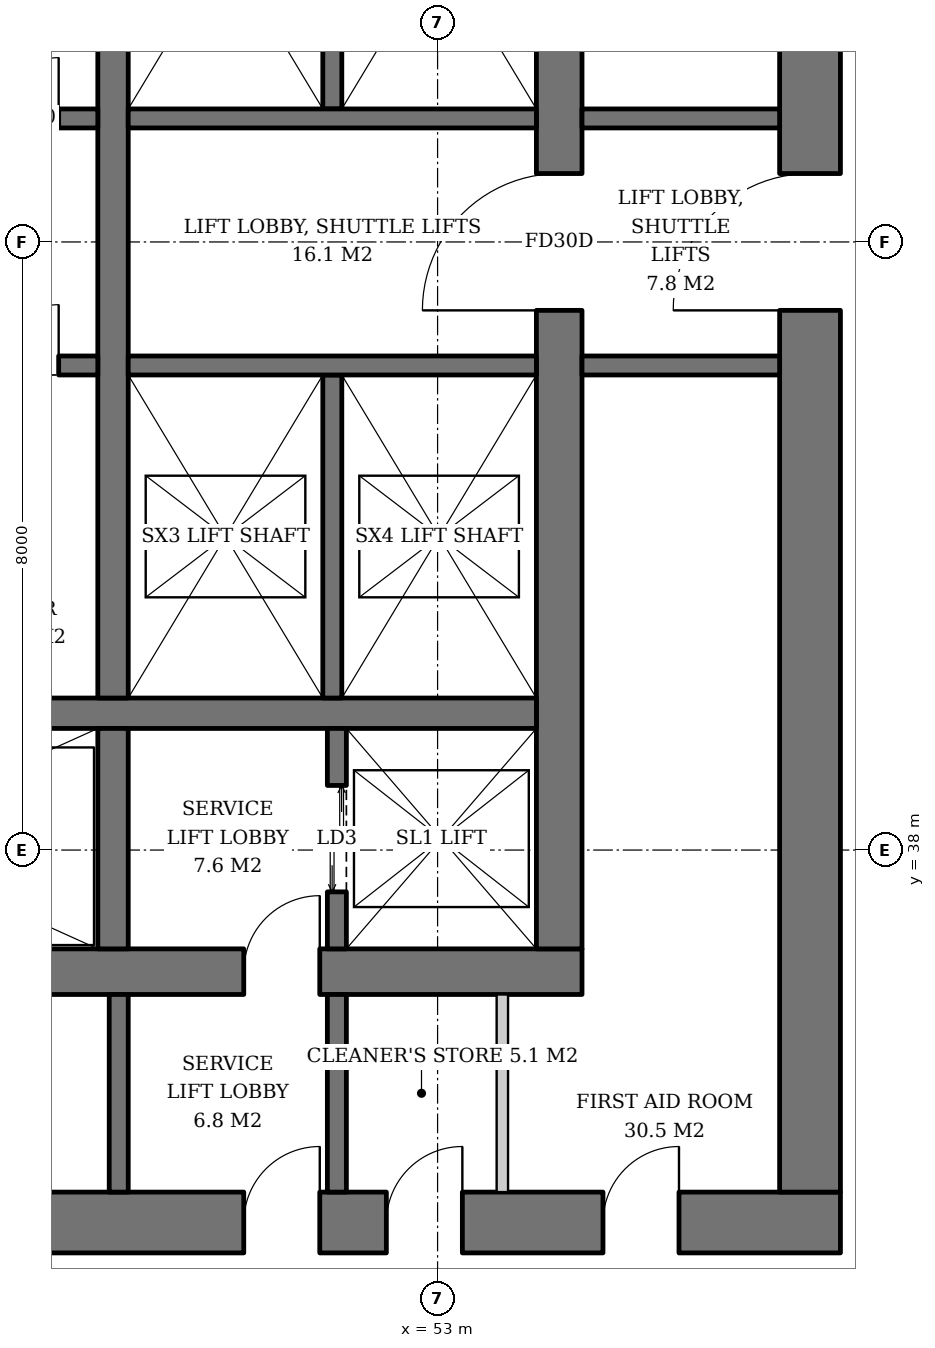
"""IFC4 building model, lengths in metres.
Left out: names, types, materials, properties, quantities, classifications, styles, units other than length and angle.
Written with IfcOpenShell. Run it as: python <this file> out.ifc"""

import sys

from ifc_helpers import new_model, si_unit, direction, frame, frame_2d, origin, place, context, subcontext, project, spatial, rectangle, extrude, element, fill, save


model = new_model("IFC4")
c1 = context("Model", 3, precision=1e-05, world=origin(), true_north=direction((0.0, 1.0)))
c2 = subcontext(c1, "Body", "Model", "MODEL_VIEW")
j1 = project(units=[si_unit("LENGTHUNIT", "METRE"), si_unit("PLANEANGLEUNIT", "RADIAN")], contexts=[c1])
p1 = place(None, origin())
s1 = spatial("IfcSite", under=j1, at=p1, CompositionType="ELEMENT")
p2 = place(p1, origin())
s2 = spatial("IfcBuilding", under=s1, at=p2, CompositionType="ELEMENT")
p3 = place(p2, frame((0.0, 0.0, 62.8)))
s3 = spatial("IfcBuildingStorey", under=s2, at=p3, CompositionType="ELEMENT", Elevation=62.8)
p4 = place(p3, frame((35.1, 36.4, 0.0), z_axis=(0.0, 0.0, 1.0), x_axis=(1.0, 0.0, 0.0)))
e1 = element("IfcWall", 1, at=p4, inside=s3, PredefinedType="SHEAR", context=c2, shape_type="SweptSolid", body=[
    extrude(rectangle(XDim=19.8, YDim=0.6, at=frame_2d((9.9, 0.0))), origin(), (0.0, 0.0, 1.0), 3.8),
])
p5 = place(p4, frame((3.9, 0.0, 0.0)))
e2 = element("IfcOpeningElement", 2, at=p5, cuts=e1, PredefinedType="OPENING", context=c2, shape_type="SweptSolid", body=[
    extrude(rectangle(XDim=1.0, YDim=2.1, at=frame_2d((0.5, 1.05))), frame((0.0, 0.31, 0.0), z_axis=(0.0, -1.0, 0.0), x_axis=(1.0, 0.0, 0.0)), (0.0, 0.0, 1.0), 0.62),
])
p6 = place(p4, frame((15.35, 0.0, 0.0)))
e3 = element("IfcOpeningElement", 3, at=p6, cuts=e1, PredefinedType="OPENING", context=c2, shape_type="SweptSolid", body=[
    extrude(rectangle(XDim=1.0, YDim=2.1, at=frame_2d((0.5, 1.05))), frame((0.0, 0.31, 0.0), z_axis=(0.0, -1.0, 0.0), x_axis=(1.0, 0.0, 0.0)), (0.0, 0.0, 1.0), 0.62),
])
p7 = place(p3, frame((54.6, 36.7, 0.0), z_axis=(0.0, 0.0, 1.0), x_axis=(0.0, 1.0, 0.0)))
e4 = element("IfcWall", 4, at=p7, inside=s3, PredefinedType="SHEAR", context=c2, shape_type="SweptSolid", body=[
    extrude(rectangle(XDim=18.6, YDim=0.6, at=frame_2d((9.3, 0.0))), origin(), (0.0, 0.0, 1.0), 3.8),
])
p8 = place(p7, frame((8.4, 0.0, 0.0)))
e5 = element("IfcOpeningElement", 5, at=p8, cuts=e4, PredefinedType="OPENING", context=c2, shape_type="SweptSolid", body=[
    extrude(rectangle(XDim=1.8, YDim=2.4, at=frame_2d((0.9, 1.2))), frame((0.0, 0.31, 0.0), z_axis=(0.0, -1.0, 0.0), x_axis=(1.0, 0.0, 0.0)), (0.0, 0.0, 1.0), 0.62),
])
p9 = place(p3, frame((31.7, 33.1, 0.0), z_axis=(0.0, 0.0, 1.0), x_axis=(1.0, 0.0, 0.0)))
e6 = element("IfcWall", 6, at=p9, inside=s3, PredefinedType="SHEAR", context=c2, shape_type="SweptSolid", body=[
    extrude(rectangle(XDim=26.6, YDim=0.8, at=frame_2d((13.3, 0.0))), origin(), (0.0, 0.0, 1.0), 3.8),
])
p10 = place(p9, frame((7.3, 0.0, 0.0)))
e7 = element("IfcOpeningElement", 7, at=p10, cuts=e6, PredefinedType="OPENING", context=c2, shape_type="SweptSolid", body=[
    extrude(rectangle(XDim=1.0, YDim=2.1, at=frame_2d((0.5, 1.05))), frame((0.0, 0.41, 0.0), z_axis=(0.0, -1.0, 0.0), x_axis=(1.0, 0.0, 0.0)), (0.0, 0.0, 1.0), 0.82),
])
p11 = place(p9, frame((18.75, 0.0, 0.0)))
e8 = element("IfcOpeningElement", 8, at=p11, cuts=e6, PredefinedType="OPENING", context=c2, shape_type="SweptSolid", body=[
    extrude(rectangle(XDim=1.0, YDim=2.1, at=frame_2d((0.5, 1.05))), frame((0.0, 0.41, 0.0), z_axis=(0.0, -1.0, 0.0), x_axis=(1.0, 0.0, 0.0)), (0.0, 0.0, 1.0), 0.82),
])
p12 = place(p9, frame((1.9, 0.0, 0.0)))
e9 = element("IfcOpeningElement", 9, at=p12, cuts=e6, PredefinedType="OPENING", context=c2, shape_type="SweptSolid", body=[
    extrude(rectangle(XDim=1.0, YDim=2.1, at=frame_2d((0.5, 1.05))), frame((0.0, 0.41, 0.0), z_axis=(0.0, -1.0, 0.0), x_axis=(1.0, 0.0, 0.0)), (0.0, 0.0, 1.0), 0.82),
])
p13 = place(p9, frame((4.725, 0.0, 0.0)))
e10 = element("IfcOpeningElement", 10, at=p13, cuts=e6, PredefinedType="OPENING", context=c2, shape_type="SweptSolid", body=[
    extrude(rectangle(XDim=1.0, YDim=2.1, at=frame_2d((0.5, 1.05))), frame((0.0, 0.41, 0.0), z_axis=(0.0, -1.0, 0.0), x_axis=(1.0, 0.0, 0.0)), (0.0, 0.0, 1.0), 0.82),
])
p14 = place(p9, frame((12.44, 0.0, 0.0)))
e11 = element("IfcOpeningElement", 11, at=p14, cuts=e6, PredefinedType="OPENING", context=c2, shape_type="SweptSolid", body=[
    extrude(rectangle(XDim=1.0, YDim=2.1, at=frame_2d((0.5, 1.05))), frame((0.0, 0.41, 0.0), z_axis=(0.0, -1.0, 0.0), x_axis=(1.0, 0.0, 0.0)), (0.0, 0.0, 1.0), 0.82),
])
p15 = place(p9, frame((20.626, 0.0, 0.0)))
e12 = element("IfcOpeningElement", 12, at=p15, cuts=e6, PredefinedType="OPENING", context=c2, shape_type="SweptSolid", body=[
    extrude(rectangle(XDim=1.0, YDim=2.1, at=frame_2d((0.5, 1.05))), frame((0.0, 0.41, 0.0), z_axis=(0.0, -1.0, 0.0), x_axis=(1.0, 0.0, 0.0)), (0.0, 0.0, 1.0), 0.82),
])
p16 = place(p9, frame((23.476, 0.0, 0.0)))
e13 = element("IfcOpeningElement", 13, at=p16, cuts=e6, PredefinedType="OPENING", context=c2, shape_type="SweptSolid", body=[
    extrude(rectangle(XDim=1.0, YDim=2.1, at=frame_2d((0.5, 1.05))), frame((0.0, 0.41, 0.0), z_axis=(0.0, -1.0, 0.0), x_axis=(1.0, 0.0, 0.0)), (0.0, 0.0, 1.0), 0.82),
])
p17 = place(p3, frame((57.9, 33.5, 0.0), z_axis=(0.0, 0.0, 1.0), x_axis=(0.0, 1.0, 0.0)))
e14 = element("IfcWall", 14, at=p17, inside=s3, PredefinedType="SHEAR", context=c2, shape_type="SweptSolid", body=[
    extrude(rectangle(XDim=25.0, YDim=0.8, at=frame_2d((12.5, 0.0))), origin(), (0.0, 0.0, 1.0), 3.8),
])
p18 = place(p17, frame((11.6, 0.0, 0.0)))
e15 = element("IfcOpeningElement", 15, at=p18, cuts=e14, PredefinedType="OPENING", context=c2, shape_type="SweptSolid", body=[
    extrude(rectangle(XDim=1.8, YDim=2.4, at=frame_2d((0.9, 1.2))), frame((0.0, 0.41, 0.0), z_axis=(0.0, -1.0, 0.0), x_axis=(1.0, 0.0, 0.0)), (0.0, 0.0, 1.0), 0.82),
])
p19 = place(p3, frame((35.7, 39.8, 0.0), z_axis=(0.0, 0.0, 1.0), x_axis=(1.0, 0.0, 0.0)))
e16 = element("IfcWall", 16, at=p19, inside=s3, PredefinedType="SHEAR", context=c2, shape_type="SweptSolid", body=[
    extrude(rectangle(XDim=18.6, YDim=0.4, at=frame_2d((9.3, 0.0))), origin(), (0.0, 0.0, 1.0), 3.8),
])
p20 = place(p3, frame((48.73, 36.7, 0.0), z_axis=(0.0, 0.0, 1.0), x_axis=(0.0, 1.0, 0.0)))
e17 = element("IfcWall", 17, at=p20, inside=s3, PredefinedType="SHEAR", context=c2, shape_type="SweptSolid", body=[
    extrude(rectangle(XDim=2.9, YDim=0.4, at=frame_2d((1.45, 0.0))), origin(), (0.0, 0.0, 1.0), 3.8),
])
p21 = place(p3, frame((48.73, 40.0, 0.0), z_axis=(0.0, 0.0, 1.0), x_axis=(0.0, 1.0, 0.0)))
e18 = element("IfcWall", 18, at=p21, inside=s3, PredefinedType="SHEAR", context=c2, shape_type="SweptSolid", body=[
    extrude(rectangle(XDim=12.0, YDim=0.4, at=frame_2d((6.0, 0.0))), origin(), (0.0, 0.0, 1.0), 3.8),
])
p22 = place(p3, frame((51.675, 36.7, 0.0), z_axis=(0.0, 0.0, 1.0), x_axis=(0.0, 1.0, 0.0)))
e19 = element("IfcWall", 19, at=p22, inside=s3, PredefinedType="SHEAR", context=c2, shape_type="SweptSolid", body=[
    extrude(rectangle(XDim=2.9, YDim=0.25, at=frame_2d((1.45, 0.0))), origin(), (0.0, 0.0, 1.0), 3.8),
])
p23 = place(p22, frame((0.75, 0.0, 0.0)))
e20 = element("IfcOpeningElement", 20, at=p23, cuts=e19, PredefinedType="OPENING", context=c2, shape_type="SweptSolid", body=[
    extrude(rectangle(XDim=1.4, YDim=2.4, at=frame_2d((0.7, 1.2))), frame((0.0, 0.135, 0.0), z_axis=(0.0, -1.0, 0.0), x_axis=(1.0, 0.0, 0.0)), (0.0, 0.0, 1.0), 0.27),
])
p24 = place(p3, frame((35.7, 47.625, 0.0), z_axis=(0.0, 0.0, 1.0), x_axis=(1.0, 0.0, 0.0)))
e21 = element("IfcWall", 21, at=p24, inside=s3, PredefinedType="SHEAR", context=c2, shape_type="SweptSolid", body=[
    extrude(rectangle(XDim=12.83, YDim=0.25, at=frame_2d((6.415, 0.0))), origin(), (0.0, 0.0, 1.0), 3.8),
])
p25 = place(p24, frame((0.7, 0.0, 0.0)))
e22 = element("IfcOpeningElement", 22, at=p25, cuts=e21, PredefinedType="OPENING", context=c2, shape_type="SweptSolid", body=[
    extrude(rectangle(XDim=1.1, YDim=2.2, at=frame_2d((0.55, 1.1))), frame((0.0, 0.135, 0.0), z_axis=(0.0, -1.0, 0.0), x_axis=(1.0, 0.0, 0.0)), (0.0, 0.0, 1.0), 0.27),
])
p26 = place(p24, frame((3.45, 0.0, 0.0)))
e23 = element("IfcOpeningElement", 23, at=p26, cuts=e21, PredefinedType="OPENING", context=c2, shape_type="SweptSolid", body=[
    extrude(rectangle(XDim=1.1, YDim=2.2, at=frame_2d((0.55, 1.1))), frame((0.0, 0.135, 0.0), z_axis=(0.0, -1.0, 0.0), x_axis=(1.0, 0.0, 0.0)), (0.0, 0.0, 1.0), 0.27),
])
p27 = place(p24, frame((6.2, 0.0, 0.0)))
e24 = element("IfcOpeningElement", 24, at=p27, cuts=e21, PredefinedType="OPENING", context=c2, shape_type="SweptSolid", body=[
    extrude(rectangle(XDim=1.1, YDim=2.2, at=frame_2d((0.55, 1.1))), frame((0.0, 0.135, 0.0), z_axis=(0.0, -1.0, 0.0), x_axis=(1.0, 0.0, 0.0)), (0.0, 0.0, 1.0), 0.27),
])
p28 = place(p24, frame((8.95, 0.0, 0.0)))
e25 = element("IfcOpeningElement", 25, at=p28, cuts=e21, PredefinedType="OPENING", context=c2, shape_type="SweptSolid", body=[
    extrude(rectangle(XDim=1.1, YDim=2.2, at=frame_2d((0.55, 1.1))), frame((0.0, 0.135, 0.0), z_axis=(0.0, -1.0, 0.0), x_axis=(1.0, 0.0, 0.0)), (0.0, 0.0, 1.0), 0.27),
])
p29 = place(p24, frame((11.515, 0.0, 0.0)))
e26 = element("IfcOpeningElement", 26, at=p29, cuts=e21, PredefinedType="OPENING", context=c2, shape_type="SweptSolid", body=[
    extrude(rectangle(XDim=0.8, YDim=2.0, at=frame_2d((0.4, 1.0))), frame((0.0, 0.135, 0.0), z_axis=(0.0, -1.0, 0.0), x_axis=(1.0, 0.0, 0.0)), (0.0, 0.0, 1.0), 0.27),
])
p30 = place(p3, frame((35.7, 44.375, 0.0), z_axis=(0.0, 0.0, 1.0), x_axis=(1.0, 0.0, 0.0)))
e27 = element("IfcWall", 27, at=p30, inside=s3, PredefinedType="SHEAR", context=c2, shape_type="SweptSolid", body=[
    extrude(rectangle(XDim=12.83, YDim=0.25, at=frame_2d((6.415, 0.0))), origin(), (0.0, 0.0, 1.0), 3.8),
])
p31 = place(p30, frame((0.7, 0.0, 0.0)))
e28 = element("IfcOpeningElement", 28, at=p31, cuts=e27, PredefinedType="OPENING", context=c2, shape_type="SweptSolid", body=[
    extrude(rectangle(XDim=1.1, YDim=2.2, at=frame_2d((0.55, 1.1))), frame((0.0, 0.135, 0.0), z_axis=(0.0, -1.0, 0.0), x_axis=(1.0, 0.0, 0.0)), (0.0, 0.0, 1.0), 0.27),
])
p32 = place(p30, frame((3.45, 0.0, 0.0)))
e29 = element("IfcOpeningElement", 29, at=p32, cuts=e27, PredefinedType="OPENING", context=c2, shape_type="SweptSolid", body=[
    extrude(rectangle(XDim=1.1, YDim=2.2, at=frame_2d((0.55, 1.1))), frame((0.0, 0.135, 0.0), z_axis=(0.0, -1.0, 0.0), x_axis=(1.0, 0.0, 0.0)), (0.0, 0.0, 1.0), 0.27),
])
p33 = place(p30, frame((6.2, 0.0, 0.0)))
e30 = element("IfcOpeningElement", 30, at=p33, cuts=e27, PredefinedType="OPENING", context=c2, shape_type="SweptSolid", body=[
    extrude(rectangle(XDim=1.1, YDim=2.2, at=frame_2d((0.55, 1.1))), frame((0.0, 0.135, 0.0), z_axis=(0.0, -1.0, 0.0), x_axis=(1.0, 0.0, 0.0)), (0.0, 0.0, 1.0), 0.27),
])
p34 = place(p30, frame((8.95, 0.0, 0.0)))
e31 = element("IfcOpeningElement", 31, at=p34, cuts=e27, PredefinedType="OPENING", context=c2, shape_type="SweptSolid", body=[
    extrude(rectangle(XDim=1.1, YDim=2.2, at=frame_2d((0.55, 1.1))), frame((0.0, 0.135, 0.0), z_axis=(0.0, -1.0, 0.0), x_axis=(1.0, 0.0, 0.0)), (0.0, 0.0, 1.0), 0.27),
])
p35 = place(p30, frame((11.515, 0.0, 0.0)))
e32 = element("IfcOpeningElement", 32, at=p35, cuts=e27, PredefinedType="OPENING", context=c2, shape_type="SweptSolid", body=[
    extrude(rectangle(XDim=0.8, YDim=2.0, at=frame_2d((0.4, 1.0))), frame((0.0, 0.135, 0.0), z_axis=(0.0, -1.0, 0.0), x_axis=(1.0, 0.0, 0.0)), (0.0, 0.0, 1.0), 0.27),
])
p36 = place(p3, frame((51.615, 47.75, 0.0), z_axis=(0.0, 0.0, 1.0), x_axis=(0.0, 1.0, 0.0)))
e33 = element("IfcWall", 33, at=p36, inside=s3, PredefinedType="SHEAR", context=c2, shape_type="SweptSolid", body=[
    extrude(rectangle(XDim=4.25, YDim=0.25, at=frame_2d((2.125, 0.0))), origin(), (0.0, 0.0, 1.0), 3.8),
])
p37 = place(p3, frame((48.93, 47.625, 0.0), z_axis=(0.0, 0.0, 1.0), x_axis=(1.0, 0.0, 0.0)))
e34 = element("IfcWall", 34, at=p37, inside=s3, PredefinedType="SHEAR", context=c2, shape_type="SweptSolid", body=[
    extrude(rectangle(XDim=5.37, YDim=0.25, at=frame_2d((2.685, 0.0))), origin(), (0.0, 0.0, 1.0), 3.8),
])
p38 = place(p3, frame((51.615, 44.25, 0.0), z_axis=(0.0, 0.0, 1.0), x_axis=(0.0, -1.0, 0.0)))
e35 = element("IfcWall", 35, at=p38, inside=s3, PredefinedType="SHEAR", context=c2, shape_type="SweptSolid", body=[
    extrude(rectangle(XDim=4.25, YDim=0.25, at=frame_2d((2.125, 0.0))), origin(), (0.0, 0.0, 1.0), 3.8),
])
p39 = place(p3, frame((48.93, 44.375, 0.0), z_axis=(0.0, 0.0, 1.0), x_axis=(1.0, 0.0, 0.0)))
e36 = element("IfcWall", 36, at=p39, inside=s3, PredefinedType="SHEAR", context=c2, shape_type="SweptSolid", body=[
    extrude(rectangle(XDim=5.37, YDim=0.25, at=frame_2d((2.685, 0.0))), origin(), (0.0, 0.0, 1.0), 3.8),
])
for number, where, z_axis, x_axis in (
    (37, (54.9, 44.375, 0.0), (0.0, 0.0, 1.0), (1.0, 0.0, 0.0)),
    (38, (54.9, 47.625, 0.0), (0.0, 0.0, 1.0), (1.0, 0.0, 0.0)),
    (39, (48.805, 33.5, 0.0), (0.0, 0.0, 1.0), (0.0, 1.0, 0.0)),
    (40, (51.675, 33.5, 0.0), (0.0, 0.0, 1.0), (0.0, 1.0, 0.0)),
):
    element("IfcWall", number, at=place(p3, frame(where, z_axis=z_axis, x_axis=x_axis)), inside=s3, PredefinedType="SOLIDWALL", context=c2, shape_type="SweptSolid", body=[
        extrude(rectangle(XDim=2.6, YDim=0.25, at=frame_2d((1.3, 0.0))), origin(), (0.0, 0.0, 1.0), 3.62),
    ])
p40 = place(p3, frame((53.852, 33.5, 0.0), z_axis=(0.0, 0.0, 1.0), x_axis=(0.0, 1.0, 0.0)))
e41 = element("IfcWall", 41, at=p40, inside=s3, PredefinedType="SOLIDWALL", context=c2, shape_type="SweptSolid", body=[
    extrude(rectangle(XDim=2.6, YDim=0.15, at=frame_2d((1.3, 0.0))), origin(), (0.0, 0.0, 1.0), 3.62),
])
p41 = place(p23, origin())
e42 = element("IfcDoor", 42, at=p41, inside=s3, OperationType="DOUBLE_DOOR_SLIDING", PredefinedType="DOOR", context=c2, shape_type="SweptSolid", body=[
    extrude(rectangle(XDim=1.4, YDim=2.4, at=frame_2d((0.7, 1.2))), frame((0.0, 0.025, 0.0), z_axis=(0.0, -1.0, 0.0), x_axis=(1.0, 0.0, 0.0)), (0.0, 0.0, 1.0), 0.05),
])
fill(e20, e42)
p42 = place(p29, origin())
e43 = element("IfcDoor", 43, at=p42, inside=s3, OperationType="SINGLE_SWING_RIGHT", PredefinedType="DOOR", context=c2, shape_type="SweptSolid", body=[
    extrude(rectangle(XDim=0.8, YDim=2.0, at=frame_2d((0.4, 1.0))), frame((0.0, 0.025, 0.0), z_axis=(0.0, -1.0, 0.0), x_axis=(1.0, 0.0, 0.0)), (0.0, 0.0, 1.0), 0.05),
])
fill(e26, e43)
p43 = place(p35, origin())
e44 = element("IfcDoor", 44, at=p43, inside=s3, OperationType="SINGLE_SWING_RIGHT", PredefinedType="DOOR", context=c2, shape_type="SweptSolid", body=[
    extrude(rectangle(XDim=0.8, YDim=2.0, at=frame_2d((0.4, 1.0))), frame((0.0, 0.025, 0.0), z_axis=(0.0, -1.0, 0.0), x_axis=(1.0, 0.0, 0.0)), (0.0, 0.0, 1.0), 0.05),
])
fill(e32, e44)
p44 = place(p8, origin())
e45 = element("IfcDoor", 45, at=p44, inside=s3, OperationType="DOUBLE_DOOR_SINGLE_SWING", PredefinedType="DOOR", context=c2, shape_type="SweptSolid", body=[
    extrude(rectangle(XDim=1.8, YDim=2.4, at=frame_2d((0.9, 1.2))), frame((0.0, 0.025, 0.0), z_axis=(0.0, -1.0, 0.0), x_axis=(1.0, 0.0, 0.0)), (0.0, 0.0, 1.0), 0.05),
])
fill(e5, e45)
p45 = place(p6, origin())
e46 = element("IfcDoor", 46, at=p45, inside=s3, OperationType="SINGLE_SWING_RIGHT", PredefinedType="DOOR", context=c2, shape_type="SweptSolid", body=[
    extrude(rectangle(XDim=1.0, YDim=2.1, at=frame_2d((0.5, 1.05))), frame((0.0, 0.025, 0.0), z_axis=(0.0, -1.0, 0.0), x_axis=(1.0, 0.0, 0.0)), (0.0, 0.0, 1.0), 0.05),
])
fill(e3, e46)
p46 = place(p18, origin())
e47 = element("IfcDoor", 47, at=p46, inside=s3, OperationType="DOUBLE_DOOR_SINGLE_SWING", PredefinedType="DOOR", context=c2, shape_type="SweptSolid", body=[
    extrude(rectangle(XDim=1.8, YDim=2.4, at=frame_2d((0.9, 1.2))), frame((0.0, 0.025, 0.0), z_axis=(0.0, -1.0, 0.0), x_axis=(1.0, 0.0, 0.0)), (0.0, 0.0, 1.0), 0.05),
])
fill(e15, e47)
p47 = place(p11, origin())
e48 = element("IfcDoor", 48, at=p47, inside=s3, OperationType="SINGLE_SWING_RIGHT", PredefinedType="DOOR", context=c2, shape_type="SweptSolid", body=[
    extrude(rectangle(XDim=1.0, YDim=2.1, at=frame_2d((0.5, 1.05))), frame((0.0, 0.025, 0.0), z_axis=(0.0, -1.0, 0.0), x_axis=(1.0, 0.0, 0.0)), (0.0, 0.0, 1.0), 0.05),
])
fill(e8, e48)
p48 = place(p15, origin())
e49 = element("IfcDoor", 49, at=p48, inside=s3, OperationType="SINGLE_SWING_RIGHT", PredefinedType="DOOR", context=c2, shape_type="SweptSolid", body=[
    extrude(rectangle(XDim=1.0, YDim=2.1, at=frame_2d((0.5, 1.05))), frame((0.0, 0.39, 0.0), z_axis=(0.0, -1.0, 0.0), x_axis=(1.0, 0.0, 0.0)), (0.0, 0.0, 1.0), 0.05),
])
fill(e12, e49)
p49 = place(p16, origin())
e50 = element("IfcDoor", 50, at=p49, inside=s3, OperationType="SINGLE_SWING_RIGHT", PredefinedType="DOOR", context=c2, shape_type="SweptSolid", body=[
    extrude(rectangle(XDim=1.0, YDim=2.1, at=frame_2d((0.5, 1.05))), frame((0.0, 0.39, 0.0), z_axis=(0.0, -1.0, 0.0), x_axis=(1.0, 0.0, 0.0)), (0.0, 0.0, 1.0), 0.05),
])
fill(e13, e50)
save(model, sys.argv[1])
